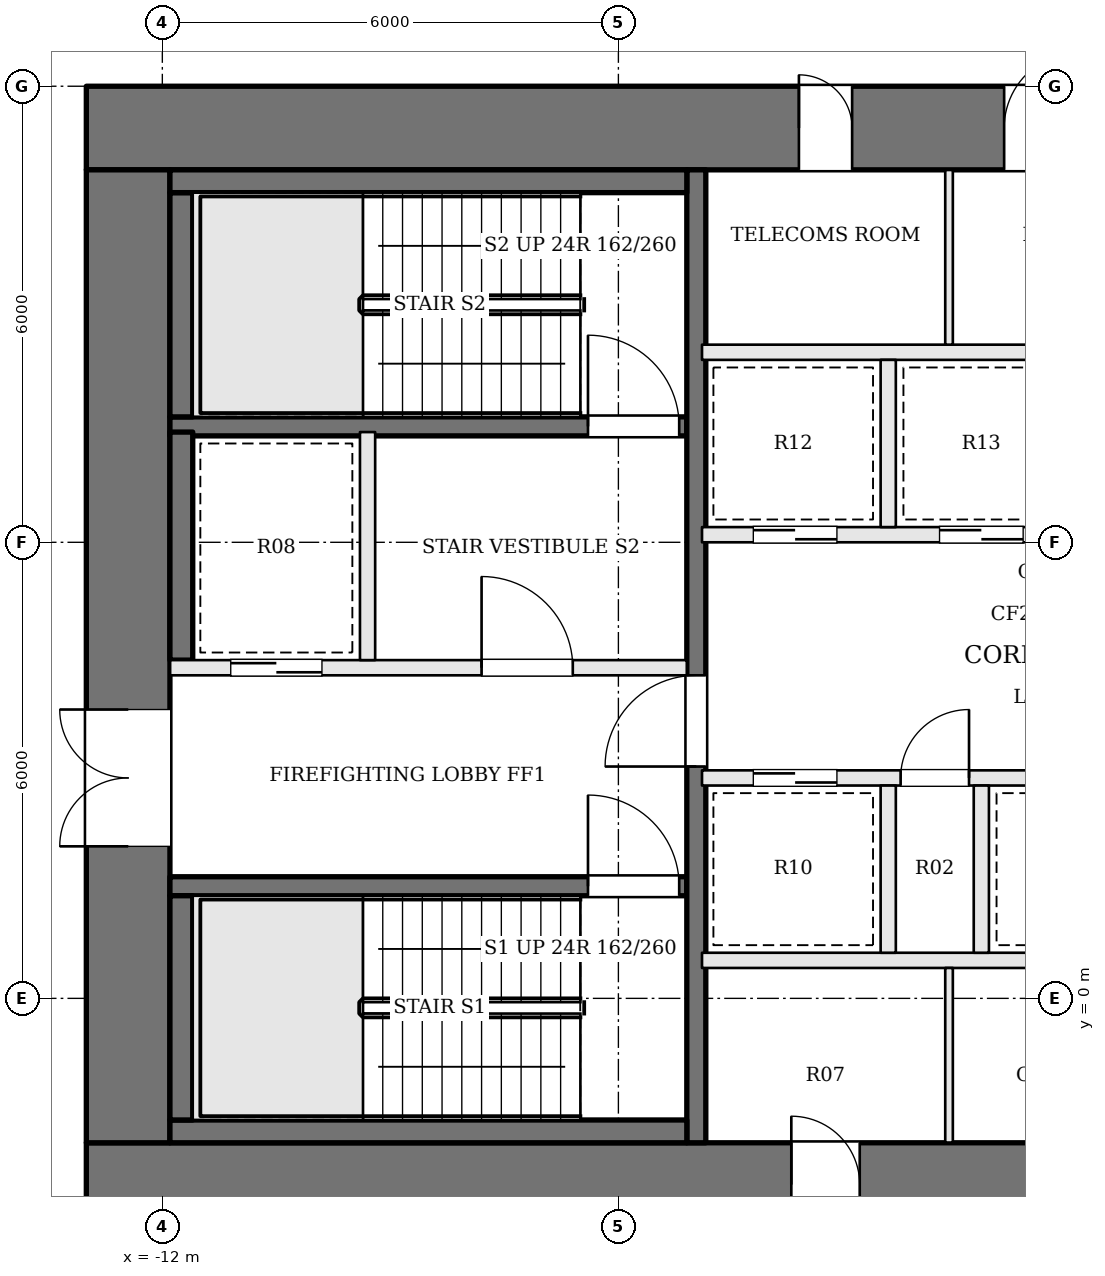
"""IFC4 building model, lengths in metres.
Left out: names, types, materials, properties, quantities, classifications, styles, units other than length and angle.
Written with IfcOpenShell. Run it as: python <this file> out.ifc"""

import sys

from ifc_helpers import new_model, si_unit, direction, frame, frame_2d, origin, place, context, subcontext, project, spatial, rectangle, extrude, element, fill, save


model = new_model("IFC4")
c1 = context("Model", 3, precision=1e-05, world=origin(), true_north=direction((0.0, 1.0)))
c2 = subcontext(c1, "Body", "Model", "MODEL_VIEW")
j1 = project(units=[si_unit("LENGTHUNIT", "METRE"), si_unit("PLANEANGLEUNIT", "RADIAN")], contexts=[c1])
p1 = place(None, origin())
s1 = spatial("IfcSite", under=j1, at=p1, CompositionType="ELEMENT")
p2 = place(p1, origin())
s2 = spatial("IfcBuilding", under=s1, at=p2, CompositionType="ELEMENT")
p3 = place(p2, frame((0.0, 0.0, 153.9)))
s3 = spatial("IfcBuildingStorey", under=s2, at=p3, CompositionType="ELEMENT", Elevation=153.9)
p4 = place(p3, frame((-13.0, 11.45, 0.0), z_axis=(0.0, 0.0, 1.0), x_axis=(1.0, 0.0, 0.0)))
e1 = element("IfcWall", 1, at=p4, inside=s3, PredefinedType="SHEAR", context=c2, shape_type="SweptSolid", body=[
    extrude(rectangle(XDim=26.0, YDim=1.1, at=frame_2d((13.0, 0.0))), origin(), (0.0, 0.0, 1.0), 3.9),
])
p5 = place(p4, frame((9.375, 0.0, 0.0)))
e2 = element("IfcOpeningElement", 2, at=p5, cuts=e1, PredefinedType="OPENING", context=c2, shape_type="SweptSolid", body=[
    extrude(rectangle(XDim=0.7, YDim=2.1, at=frame_2d((0.35, 1.05))), frame((0.0, 0.56, 0.0), z_axis=(0.0, -1.0, 0.0), x_axis=(1.0, 0.0, 0.0)), (0.0, 0.0, 1.0), 1.12),
])
p6 = place(p4, frame((12.075, 0.0, 0.0)))
e3 = element("IfcOpeningElement", 3, at=p6, cuts=e1, PredefinedType="OPENING", context=c2, shape_type="SweptSolid", body=[
    extrude(rectangle(XDim=1.0, YDim=2.1, at=frame_2d((0.5, 1.05))), frame((0.0, 0.56, 0.0), z_axis=(0.0, -1.0, 0.0), x_axis=(1.0, 0.0, 0.0)), (0.0, 0.0, 1.0), 1.12),
])
p7 = place(p4, frame((14.675, 0.0, 0.0)))
e4 = element("IfcOpeningElement", 4, at=p7, cuts=e1, PredefinedType="OPENING", context=c2, shape_type="SweptSolid", body=[
    extrude(rectangle(XDim=0.7, YDim=2.1, at=frame_2d((0.35, 1.05))), frame((0.0, 0.56, 0.0), z_axis=(0.0, -1.0, 0.0), x_axis=(1.0, 0.0, 0.0)), (0.0, 0.0, 1.0), 1.12),
])
p8 = place(p4, frame((16.625, 0.0, 0.0)))
e5 = element("IfcOpeningElement", 5, at=p8, cuts=e1, PredefinedType="OPENING", context=c2, shape_type="SweptSolid", body=[
    extrude(rectangle(XDim=0.9, YDim=2.1, at=frame_2d((0.45, 1.05))), frame((0.0, 0.56, 0.0), z_axis=(0.0, -1.0, 0.0), x_axis=(1.0, 0.0, 0.0)), (0.0, 0.0, 1.0), 1.12),
])
p9 = place(p3, frame((-13.0, -2.45, 0.0), z_axis=(0.0, 0.0, 1.0), x_axis=(1.0, 0.0, 0.0)))
e6 = element("IfcWall", 6, at=p9, inside=s3, PredefinedType="SHEAR", context=c2, shape_type="SweptSolid", body=[
    extrude(rectangle(XDim=26.0, YDim=1.1, at=frame_2d((13.0, 0.0))), origin(), (0.0, 0.0, 1.0), 3.9),
])
p10 = place(p9, frame((9.275, 0.0, 0.0)))
e7 = element("IfcOpeningElement", 7, at=p10, cuts=e6, PredefinedType="OPENING", context=c2, shape_type="SweptSolid", body=[
    extrude(rectangle(XDim=0.9, YDim=2.1, at=frame_2d((0.45, 1.05))), frame((0.0, 0.56, 0.0), z_axis=(0.0, -1.0, 0.0), x_axis=(1.0, 0.0, 0.0)), (0.0, 0.0, 1.0), 1.12),
])
p11 = place(p9, frame((12.525, 0.0, 0.0)))
e8 = element("IfcOpeningElement", 8, at=p11, cuts=e6, PredefinedType="OPENING", context=c2, shape_type="SweptSolid", body=[
    extrude(rectangle(XDim=0.9, YDim=2.1, at=frame_2d((0.45, 1.05))), frame((0.0, 0.56, 0.0), z_axis=(0.0, -1.0, 0.0), x_axis=(1.0, 0.0, 0.0)), (0.0, 0.0, 1.0), 1.12),
])
p12 = place(p9, frame((15.0, 0.0, 0.0)))
e9 = element("IfcOpeningElement", 9, at=p12, cuts=e6, PredefinedType="OPENING", context=c2, shape_type="SweptSolid", body=[
    extrude(rectangle(XDim=1.0, YDim=2.1, at=frame_2d((0.5, 1.05))), frame((0.0, 0.56, 0.0), z_axis=(0.0, -1.0, 0.0), x_axis=(1.0, 0.0, 0.0)), (0.0, 0.0, 1.0), 1.12),
])
p13 = place(p9, frame((16.7, 0.0, 0.0)))
e10 = element("IfcOpeningElement", 10, at=p13, cuts=e6, PredefinedType="OPENING", context=c2, shape_type="SweptSolid", body=[
    extrude(rectangle(XDim=0.9, YDim=2.1, at=frame_2d((0.45, 1.05))), frame((0.0, 0.56, 0.0), z_axis=(0.0, -1.0, 0.0), x_axis=(1.0, 0.0, 0.0)), (0.0, 0.0, 1.0), 1.12),
])
p14 = place(p3, frame((-12.45, -1.9, 0.0), z_axis=(0.0, 0.0, 1.0), x_axis=(0.0, 1.0, 0.0)))
e11 = element("IfcWall", 11, at=p14, inside=s3, PredefinedType="SHEAR", context=c2, shape_type="SweptSolid", body=[
    extrude(rectangle(XDim=12.8, YDim=1.1, at=frame_2d((6.4, 0.0))), origin(), (0.0, 0.0, 1.0), 3.9),
])
p15 = place(p14, frame((3.9, 0.0, 0.0)))
e12 = element("IfcOpeningElement", 12, at=p15, cuts=e11, PredefinedType="OPENING", context=c2, shape_type="SweptSolid", body=[
    extrude(rectangle(XDim=1.8, YDim=2.1, at=frame_2d((0.9, 1.05))), frame((0.0, 0.56, 0.0), z_axis=(0.0, -1.0, 0.0), x_axis=(1.0, 0.0, 0.0)), (0.0, 0.0, 1.0), 1.12),
])
p16 = place(p3, frame((-11.9, 1.475, 0.0), z_axis=(0.0, 0.0, 1.0), x_axis=(1.0, 0.0, 0.0)))
e13 = element("IfcWall", 13, at=p16, inside=s3, PredefinedType="SOLIDWALL", context=c2, shape_type="SweptSolid", body=[
    extrude(rectangle(XDim=6.8, YDim=0.25, at=frame_2d((3.4, 0.0))), origin(), (0.0, 0.0, 1.0), 3.7),
])
p17 = place(p16, frame((5.5, 0.0, 0.0)))
e14 = element("IfcOpeningElement", 14, at=p17, cuts=e13, PredefinedType="OPENING", context=c2, shape_type="SweptSolid", body=[
    extrude(rectangle(XDim=1.2, YDim=2.1, at=frame_2d((0.6, 1.05))), frame((0.0, 0.135, 0.0), z_axis=(0.0, -1.0, 0.0), x_axis=(1.0, 0.0, 0.0)), (0.0, 0.0, 1.0), 0.27),
])
p18 = place(p3, frame((-11.9, 4.35, 0.0), z_axis=(0.0, 0.0, 1.0), x_axis=(1.0, 0.0, 0.0)))
e15 = element("IfcWall", 15, at=p18, inside=s3, PredefinedType="SOLIDWALL", context=c2, shape_type="SweptSolid", body=[
    extrude(rectangle(XDim=6.8, YDim=0.2, at=frame_2d((3.4, 0.0))), origin(), (0.0, 0.0, 1.0), 3.7),
])
p19 = place(p18, frame((4.1, 0.0, 0.0)))
e16 = element("IfcOpeningElement", 16, at=p19, cuts=e15, PredefinedType="OPENING", context=c2, shape_type="SweptSolid", body=[
    extrude(rectangle(XDim=1.2, YDim=2.1, at=frame_2d((0.6, 1.05))), frame((0.0, 0.11, 0.0), z_axis=(0.0, -1.0, 0.0), x_axis=(1.0, 0.0, 0.0)), (0.0, 0.0, 1.0), 0.22),
])
p20 = place(p18, frame((0.8, 0.0, 0.0)))
e17 = element("IfcOpeningElement", 17, at=p20, cuts=e15, PredefinedType="OPENING", context=c2, shape_type="SweptSolid", body=[
    extrude(rectangle(XDim=1.2, YDim=2.1, at=frame_2d((0.6, 1.05))), frame((0.0, 0.11, 0.0), z_axis=(0.0, -1.0, 0.0), x_axis=(1.0, 0.0, 0.0)), (0.0, 0.0, 1.0), 0.22),
])
p21 = place(p3, frame((-11.9, 7.525, 0.0), z_axis=(0.0, 0.0, 1.0), x_axis=(1.0, 0.0, 0.0)))
e18 = element("IfcWall", 18, at=p21, inside=s3, PredefinedType="SOLIDWALL", context=c2, shape_type="SweptSolid", body=[
    extrude(rectangle(XDim=6.8, YDim=0.25, at=frame_2d((3.4, 0.0))), origin(), (0.0, 0.0, 1.0), 3.7),
])
p22 = place(p21, frame((5.5, 0.0, 0.0)))
e19 = element("IfcOpeningElement", 19, at=p22, cuts=e18, PredefinedType="OPENING", context=c2, shape_type="SweptSolid", body=[
    extrude(rectangle(XDim=1.2, YDim=2.1, at=frame_2d((0.6, 1.05))), frame((0.0, 0.135, 0.0), z_axis=(0.0, -1.0, 0.0), x_axis=(1.0, 0.0, 0.0)), (0.0, 0.0, 1.0), 0.27),
])
p23 = place(p3, frame((-9.3, 4.45, 0.0), z_axis=(0.0, 0.0, 1.0), x_axis=(0.0, 1.0, 0.0)))
e20 = element("IfcWall", 20, at=p23, inside=s3, PredefinedType="SOLIDWALL", context=c2, shape_type="SweptSolid", body=[
    extrude(rectangle(XDim=3.0, YDim=0.2, at=frame_2d((1.5, 0.0))), origin(), (0.0, 0.0, 1.0), 3.7),
])
p24 = place(p3, frame((-4.975, -1.9, 0.0), z_axis=(0.0, 0.0, 1.0), x_axis=(0.0, 1.0, 0.0)))
e21 = element("IfcWall", 21, at=p24, inside=s3, PredefinedType="SOLIDWALL", context=c2, shape_type="SweptSolid", body=[
    extrude(rectangle(XDim=12.8, YDim=0.25, at=frame_2d((6.4, 0.0))), origin(), (0.0, 0.0, 1.0), 3.7),
])
p25 = place(p24, frame((4.95, 0.0, 0.0)))
e22 = element("IfcOpeningElement", 22, at=p25, cuts=e21, PredefinedType="OPENING", context=c2, shape_type="SweptSolid", body=[
    extrude(rectangle(XDim=1.2, YDim=2.1, at=frame_2d((0.6, 1.05))), frame((0.0, 0.135, 0.0), z_axis=(0.0, -1.0, 0.0), x_axis=(1.0, 0.0, 0.0)), (0.0, 0.0, 1.0), 0.27),
])
p26 = place(p3, frame((-11.9, -1.75, 0.0), z_axis=(0.0, 0.0, 1.0), x_axis=(1.0, 0.0, 0.0)))
e23 = element("IfcWall", 23, at=p26, inside=s3, PredefinedType="SOLIDWALL", context=c2, shape_type="SweptSolid", body=[
    extrude(rectangle(XDim=6.8, YDim=0.3, at=frame_2d((3.4, 0.0))), origin(), (0.0, 0.0, 1.0), 3.7),
])
p27 = place(p3, frame((-11.75, -1.6, 0.0), z_axis=(0.0, 0.0, 1.0), x_axis=(0.0, 1.0, 0.0)))
e24 = element("IfcWall", 24, at=p27, inside=s3, PredefinedType="SOLIDWALL", context=c2, shape_type="SweptSolid", body=[
    extrude(rectangle(XDim=2.95, YDim=0.3, at=frame_2d((1.475, 0.0))), origin(), (0.0, 0.0, 1.0), 3.7),
])
p28 = place(p3, frame((-11.75, 4.45, 0.0), z_axis=(0.0, 0.0, 1.0), x_axis=(0.0, 1.0, 0.0)))
e25 = element("IfcWall", 25, at=p28, inside=s3, PredefinedType="SOLIDWALL", context=c2, shape_type="SweptSolid", body=[
    extrude(rectangle(XDim=3.0, YDim=0.3, at=frame_2d((1.5, 0.0))), origin(), (0.0, 0.0, 1.0), 3.7),
])
p29 = place(p3, frame((-11.75, 7.65, 0.0), z_axis=(0.0, 0.0, 1.0), x_axis=(0.0, 1.0, 0.0)))
e26 = element("IfcWall", 26, at=p29, inside=s3, PredefinedType="SOLIDWALL", context=c2, shape_type="SweptSolid", body=[
    extrude(rectangle(XDim=2.95, YDim=0.3, at=frame_2d((1.475, 0.0))), origin(), (0.0, 0.0, 1.0), 3.7),
])
p30 = place(p3, frame((-11.9, 10.75, 0.0), z_axis=(0.0, 0.0, 1.0), x_axis=(1.0, 0.0, 0.0)))
e27 = element("IfcWall", 27, at=p30, inside=s3, PredefinedType="SOLIDWALL", context=c2, shape_type="SweptSolid", body=[
    extrude(rectangle(XDim=6.8, YDim=0.3, at=frame_2d((3.4, 0.0))), origin(), (0.0, 0.0, 1.0), 3.7),
])
p31 = place(p3, frame((-4.9, 0.5, 0.0), z_axis=(0.0, 0.0, 1.0), x_axis=(1.0, 0.0, 0.0)))
e28 = element("IfcWall", 28, at=p31, inside=s3, PredefinedType="SOLIDWALL", context=c2, shape_type="SweptSolid", body=[
    extrude(rectangle(XDim=9.8, YDim=0.2, at=frame_2d((4.9, 0.0))), origin(), (0.0, 0.0, 1.0), 3.7),
])
p32 = place(p3, frame((-4.9, 2.9, 0.0), z_axis=(0.0, 0.0, 1.0), x_axis=(1.0, 0.0, 0.0)))
e29 = element("IfcWall", 29, at=p32, inside=s3, PredefinedType="SOLIDWALL", context=c2, shape_type="SweptSolid", body=[
    extrude(rectangle(XDim=9.8, YDim=0.2, at=frame_2d((4.9, 0.0))), origin(), (0.0, 0.0, 1.0), 3.7),
])
p33 = place(p32, frame((0.675, 0.0, 0.0)))
e30 = element("IfcOpeningElement", 30, at=p33, cuts=e29, PredefinedType="OPENING", context=c2, shape_type="SweptSolid", body=[
    extrude(rectangle(XDim=1.1, YDim=2.1, at=frame_2d((0.55, 1.05))), frame((0.0, 0.11, 0.0), z_axis=(0.0, -1.0, 0.0), x_axis=(1.0, 0.0, 0.0)), (0.0, 0.0, 1.0), 0.22),
])
p34 = place(p32, frame((2.613, 0.0, 0.0)))
e31 = element("IfcOpeningElement", 31, at=p34, cuts=e29, PredefinedType="OPENING", context=c2, shape_type="SweptSolid", body=[
    extrude(rectangle(XDim=0.9, YDim=2.1, at=frame_2d((0.45, 1.05))), frame((0.0, 0.11, 0.0), z_axis=(0.0, -1.0, 0.0), x_axis=(1.0, 0.0, 0.0)), (0.0, 0.0, 1.0), 0.22),
])
p35 = place(p32, frame((4.35, 0.0, 0.0)))
e32 = element("IfcOpeningElement", 32, at=p35, cuts=e29, PredefinedType="OPENING", context=c2, shape_type="SweptSolid", body=[
    extrude(rectangle(XDim=1.1, YDim=2.1, at=frame_2d((0.55, 1.05))), frame((0.0, 0.11, 0.0), z_axis=(0.0, -1.0, 0.0), x_axis=(1.0, 0.0, 0.0)), (0.0, 0.0, 1.0), 0.22),
])
p36 = place(p32, frame((7.463, 0.0, 0.0)))
e33 = element("IfcOpeningElement", 33, at=p36, cuts=e29, PredefinedType="OPENING", context=c2, shape_type="SweptSolid", body=[
    extrude(rectangle(XDim=1.0, YDim=2.1, at=frame_2d((0.5, 1.05))), frame((0.0, 0.11, 0.0), z_axis=(0.0, -1.0, 0.0), x_axis=(1.0, 0.0, 0.0)), (0.0, 0.0, 1.0), 0.22),
])
p37 = place(p3, frame((-4.9, 6.1, 0.0), z_axis=(0.0, 0.0, 1.0), x_axis=(1.0, 0.0, 0.0)))
e34 = element("IfcWall", 34, at=p37, inside=s3, PredefinedType="SOLIDWALL", context=c2, shape_type="SweptSolid", body=[
    extrude(rectangle(XDim=9.8, YDim=0.2, at=frame_2d((4.9, 0.0))), origin(), (0.0, 0.0, 1.0), 3.7),
])
p38 = place(p37, frame((0.675, 0.0, 0.0)))
e35 = element("IfcOpeningElement", 35, at=p38, cuts=e34, PredefinedType="OPENING", context=c2, shape_type="SweptSolid", body=[
    extrude(rectangle(XDim=1.1, YDim=2.1, at=frame_2d((0.55, 1.05))), frame((0.0, 0.11, 0.0), z_axis=(0.0, -1.0, 0.0), x_axis=(1.0, 0.0, 0.0)), (0.0, 0.0, 1.0), 0.22),
])
p39 = place(p37, frame((3.125, 0.0, 0.0)))
e36 = element("IfcOpeningElement", 36, at=p39, cuts=e34, PredefinedType="OPENING", context=c2, shape_type="SweptSolid", body=[
    extrude(rectangle(XDim=1.1, YDim=2.1, at=frame_2d((0.55, 1.05))), frame((0.0, 0.11, 0.0), z_axis=(0.0, -1.0, 0.0), x_axis=(1.0, 0.0, 0.0)), (0.0, 0.0, 1.0), 0.22),
])
p40 = place(p37, frame((5.575, 0.0, 0.0)))
e37 = element("IfcOpeningElement", 37, at=p40, cuts=e34, PredefinedType="OPENING", context=c2, shape_type="SweptSolid", body=[
    extrude(rectangle(XDim=1.1, YDim=2.1, at=frame_2d((0.55, 1.05))), frame((0.0, 0.11, 0.0), z_axis=(0.0, -1.0, 0.0), x_axis=(1.0, 0.0, 0.0)), (0.0, 0.0, 1.0), 0.22),
])
p41 = place(p37, frame((8.025, 0.0, 0.0)))
e38 = element("IfcOpeningElement", 38, at=p41, cuts=e34, PredefinedType="OPENING", context=c2, shape_type="SweptSolid", body=[
    extrude(rectangle(XDim=1.1, YDim=2.1, at=frame_2d((0.55, 1.05))), frame((0.0, 0.11, 0.0), z_axis=(0.0, -1.0, 0.0), x_axis=(1.0, 0.0, 0.0)), (0.0, 0.0, 1.0), 0.22),
])
p42 = place(p3, frame((-4.9, 8.5, 0.0), z_axis=(0.0, 0.0, 1.0), x_axis=(1.0, 0.0, 0.0)))
e39 = element("IfcWall", 39, at=p42, inside=s3, PredefinedType="SOLIDWALL", context=c2, shape_type="SweptSolid", body=[
    extrude(rectangle(XDim=9.8, YDim=0.2, at=frame_2d((4.9, 0.0))), origin(), (0.0, 0.0, 1.0), 3.7),
])
for number, where, z_axis, x_axis in (
    (40, (-2.45, 0.6, 0.0), (0.0, 0.0, 1.0), (0.0, 1.0, 0.0)),
    (41, (-1.225, 0.6, 0.0), (0.0, 0.0, 1.0), (0.0, 1.0, 0.0)),
    (42, (-2.45, 6.2, 0.0), (0.0, 0.0, 1.0), (0.0, 1.0, 0.0)),
):
    element("IfcWall", number, at=place(p3, frame(where, z_axis=z_axis, x_axis=x_axis)), inside=s3, PredefinedType="SOLIDWALL", context=c2, shape_type="SweptSolid", body=[
        extrude(rectangle(XDim=2.2, YDim=0.2, at=frame_2d((1.1, 0.0))), origin(), (0.0, 0.0, 1.0), 3.7),
    ])
for number, where, z_axis, x_axis in (
    (43, (-1.65, -1.9, 0.0), (0.0, 0.0, 1.0), (0.0, 1.0, 0.0)),
    (44, (-1.65, 8.6, 0.0), (0.0, 0.0, 1.0), (0.0, 1.0, 0.0)),
):
    element("IfcWall", number, at=place(p3, frame(where, z_axis=z_axis, x_axis=x_axis)), inside=s3, PredefinedType="PARTITIONING", context=c2, shape_type="SweptSolid", body=[
        extrude(rectangle(XDim=2.3, YDim=0.1, at=frame_2d((1.15, 0.0))), origin(), (0.0, 0.0, 1.0), 3.7),
    ])
p43 = place(p15, origin())
e45 = element("IfcDoor", 45, at=p43, inside=s3, OperationType="DOUBLE_DOOR_SINGLE_SWING", PredefinedType="DOOR", context=c2, shape_type="SweptSolid", body=[
    extrude(rectangle(XDim=1.8, YDim=2.1, at=frame_2d((0.9, 1.05))), frame((0.0, 0.025, 0.0), z_axis=(0.0, -1.0, 0.0), x_axis=(1.0, 0.0, 0.0)), (0.0, 0.0, 1.0), 0.05),
])
fill(e12, e45)
p44 = place(p25, origin())
e46 = element("IfcDoor", 46, at=p44, inside=s3, OperationType="SINGLE_SWING_LEFT", PredefinedType="DOOR", context=c2, shape_type="SweptSolid", body=[
    extrude(rectangle(XDim=1.2, YDim=2.1, at=frame_2d((0.6, 1.05))), frame((0.0, 0.025, 0.0), z_axis=(0.0, -1.0, 0.0), x_axis=(1.0, 0.0, 0.0)), (0.0, 0.0, 1.0), 0.05),
])
fill(e22, e46)
p45 = place(p19, origin())
e47 = element("IfcDoor", 47, at=p45, inside=s3, OperationType="SINGLE_SWING_LEFT", PredefinedType="DOOR", context=c2, shape_type="SweptSolid", body=[
    extrude(rectangle(XDim=1.2, YDim=2.1, at=frame_2d((0.6, 1.05))), frame((0.0, 0.025, 0.0), z_axis=(0.0, -1.0, 0.0), x_axis=(1.0, 0.0, 0.0)), (0.0, 0.0, 1.0), 0.05),
])
fill(e16, e47)
p46 = place(p17, origin())
e48 = element("IfcDoor", 48, at=p46, inside=s3, OperationType="SINGLE_SWING_LEFT", PredefinedType="DOOR", context=c2, shape_type="SweptSolid", body=[
    extrude(rectangle(XDim=1.2, YDim=2.1, at=frame_2d((0.6, 1.05))), frame((0.0, 0.025, 0.0), z_axis=(0.0, -1.0, 0.0), x_axis=(1.0, 0.0, 0.0)), (0.0, 0.0, 1.0), 0.05),
])
fill(e14, e48)
p47 = place(p22, origin())
e49 = element("IfcDoor", 49, at=p47, inside=s3, OperationType="SINGLE_SWING_LEFT", PredefinedType="DOOR", context=c2, shape_type="SweptSolid", body=[
    extrude(rectangle(XDim=1.2, YDim=2.1, at=frame_2d((0.6, 1.05))), frame((0.0, 0.025, 0.0), z_axis=(0.0, -1.0, 0.0), x_axis=(1.0, 0.0, 0.0)), (0.0, 0.0, 1.0), 0.05),
])
fill(e19, e49)
p48 = place(p20, origin())
e50 = element("IfcDoor", 50, at=p48, inside=s3, OperationType="SLIDING_TO_RIGHT", PredefinedType="DOOR", context=c2, shape_type="SweptSolid", body=[
    extrude(rectangle(XDim=1.2, YDim=2.1, at=frame_2d((0.6, 1.05))), frame((0.0, 0.025, 0.0), z_axis=(0.0, -1.0, 0.0), x_axis=(1.0, 0.0, 0.0)), (0.0, 0.0, 1.0), 0.05),
])
fill(e17, e50)
p49 = place(p33, origin())
e51 = element("IfcDoor", 51, at=p49, inside=s3, OperationType="SLIDING_TO_RIGHT", PredefinedType="DOOR", context=c2, shape_type="SweptSolid", body=[
    extrude(rectangle(XDim=1.1, YDim=2.1, at=frame_2d((0.55, 1.05))), frame((0.0, 0.025, 0.0), z_axis=(0.0, -1.0, 0.0), x_axis=(1.0, 0.0, 0.0)), (0.0, 0.0, 1.0), 0.05),
])
fill(e30, e51)
p50 = place(p34, origin())
e52 = element("IfcDoor", 52, at=p50, inside=s3, OperationType="SINGLE_SWING_RIGHT", PredefinedType="DOOR", context=c2, shape_type="SweptSolid", body=[
    extrude(rectangle(XDim=0.9, YDim=2.1, at=frame_2d((0.45, 1.05))), frame((0.0, 0.025, 0.0), z_axis=(0.0, -1.0, 0.0), x_axis=(1.0, 0.0, 0.0)), (0.0, 0.0, 1.0), 0.05),
])
fill(e31, e52)
p51 = place(p38, origin())
e53 = element("IfcDoor", 53, at=p51, inside=s3, OperationType="SLIDING_TO_RIGHT", PredefinedType="DOOR", context=c2, shape_type="SweptSolid", body=[
    extrude(rectangle(XDim=1.1, YDim=2.1, at=frame_2d((0.55, 1.05))), frame((0.0, 0.025, 0.0), z_axis=(0.0, -1.0, 0.0), x_axis=(1.0, 0.0, 0.0)), (0.0, 0.0, 1.0), 0.05),
])
fill(e35, e53)
p52 = place(p39, origin())
e54 = element("IfcDoor", 54, at=p52, inside=s3, OperationType="SLIDING_TO_LEFT", PredefinedType="DOOR", context=c2, shape_type="SweptSolid", body=[
    extrude(rectangle(XDim=1.1, YDim=2.1, at=frame_2d((0.55, 1.05))), frame((0.0, 0.025, 0.0), z_axis=(0.0, -1.0, 0.0), x_axis=(1.0, 0.0, 0.0)), (0.0, 0.0, 1.0), 0.05),
])
fill(e36, e54)
p53 = place(p10, origin())
e55 = element("IfcDoor", 55, at=p53, inside=s3, OperationType="SINGLE_SWING_LEFT", PredefinedType="DOOR", context=c2, shape_type="SweptSolid", body=[
    extrude(rectangle(XDim=0.9, YDim=2.1, at=frame_2d((0.45, 1.05))), frame((0.0, 0.025, 0.0), z_axis=(0.0, -1.0, 0.0), x_axis=(1.0, 0.0, 0.0)), (0.0, 0.0, 1.0), 0.05),
])
fill(e7, e55)
p54 = place(p5, origin())
e56 = element("IfcDoor", 56, at=p54, inside=s3, OperationType="SINGLE_SWING_LEFT", PredefinedType="DOOR", context=c2, shape_type="SweptSolid", body=[
    extrude(rectangle(XDim=0.7, YDim=2.1, at=frame_2d((0.35, 1.05))), frame((0.0, 0.025, 0.0), z_axis=(0.0, -1.0, 0.0), x_axis=(1.0, 0.0, 0.0)), (0.0, 0.0, 1.0), 0.05),
])
fill(e2, e56)
p55 = place(p6, origin())
e57 = element("IfcDoor", 57, at=p55, inside=s3, OperationType="SINGLE_SWING_RIGHT", PredefinedType="DOOR", context=c2, shape_type="SweptSolid", body=[
    extrude(rectangle(XDim=1.0, YDim=2.1, at=frame_2d((0.5, 1.05))), frame((0.0, 0.025, 0.0), z_axis=(0.0, -1.0, 0.0), x_axis=(1.0, 0.0, 0.0)), (0.0, 0.0, 1.0), 0.05),
])
fill(e3, e57)
save(model, sys.argv[1])
